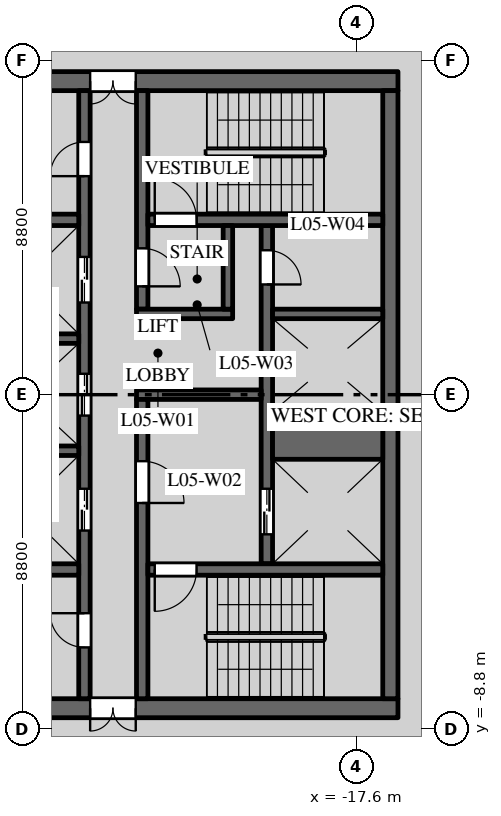
"""IFC4 building model, lengths in metres.
Left out: names, types, materials, properties, quantities, classifications, styles, units other than length and angle.
Written with IfcOpenShell. Run it as: python <this file> out.ifc"""

import sys

from ifc_helpers import new_model, si_unit, direction, frame, frame_2d, origin, place, context, subcontext, project, spatial, rectangle, extrude, element, fill, save


model = new_model("IFC4")
c1 = context("Model", 3, precision=1e-05, world=origin(), true_north=direction((0.0, 1.0)))
c2 = subcontext(c1, "Body", "Model", "MODEL_VIEW")
j1 = project(units=[si_unit("LENGTHUNIT", "METRE"), si_unit("PLANEANGLEUNIT", "RADIAN")], contexts=[c1])
p1 = place(None, origin())
s1 = spatial("IfcSite", under=j1, at=p1, CompositionType="ELEMENT")
p2 = place(p1, origin())
s2 = spatial("IfcBuilding", under=s1, at=p2, CompositionType="ELEMENT")
p3 = place(p2, frame((0.0, 0.0, 30.5)))
s3 = spatial("IfcBuildingStorey", under=s2, at=p3, CompositionType="ELEMENT", Elevation=30.5)
p4 = place(p3, frame((-16.5, 8.25, 0.0), z_axis=(0.0, 0.0, 1.0), x_axis=(-1.0, 0.0, 0.0)))
e1 = element("IfcWall", 1, at=p4, inside=s3, PredefinedType="SHEAR", context=c2, shape_type="SweptSolid", body=[
    extrude(rectangle(XDim=15.0, YDim=0.5, at=frame_2d((7.5, 0.0))), origin(), (0.0, 0.0, 1.0), 3.7),
])
p5 = place(p4, frame((6.9, 0.0, 0.0)))
e2 = element("IfcOpeningElement", 2, at=p5, cuts=e1, PredefinedType="OPENING", context=c2, shape_type="SweptSolid", body=[
    extrude(rectangle(XDim=1.2, YDim=2.1, at=frame_2d((0.6, 1.05))), frame((0.0, 0.26, 0.0), z_axis=(0.0, -1.0, 0.0), x_axis=(1.0, 0.0, 0.0)), (0.0, 0.0, 1.0), 0.52),
])
p6 = place(p4, frame((12.95, 0.0, 0.0)))
e3 = element("IfcOpeningElement", 3, at=p6, cuts=e1, PredefinedType="OPENING", context=c2, shape_type="SweptSolid", body=[
    extrude(rectangle(XDim=0.9, YDim=2.1, at=frame_2d((0.45, 1.05))), frame((0.0, 0.26, 0.0), z_axis=(0.0, -1.0, 0.0), x_axis=(1.0, 0.0, 0.0)), (0.0, 0.0, 1.0), 0.52),
])
p7 = place(p3, frame((-16.5, -8.25, 0.0), z_axis=(0.0, 0.0, 1.0), x_axis=(-1.0, 0.0, 0.0)))
e4 = element("IfcWall", 4, at=p7, inside=s3, PredefinedType="SHEAR", context=c2, shape_type="SweptSolid", body=[
    extrude(rectangle(XDim=15.0, YDim=0.5, at=frame_2d((7.5, 0.0))), origin(), (0.0, 0.0, 1.0), 3.7),
])
p8 = place(p7, frame((6.9, 0.0, 0.0)))
e5 = element("IfcOpeningElement", 5, at=p8, cuts=e4, PredefinedType="OPENING", context=c2, shape_type="SweptSolid", body=[
    extrude(rectangle(XDim=1.2, YDim=2.1, at=frame_2d((0.6, 1.05))), frame((0.0, 0.26, 0.0), z_axis=(0.0, -1.0, 0.0), x_axis=(1.0, 0.0, 0.0)), (0.0, 0.0, 1.0), 0.52),
])
p9 = place(p7, frame((12.95, 0.0, 0.0)))
e6 = element("IfcOpeningElement", 6, at=p9, cuts=e4, PredefinedType="OPENING", context=c2, shape_type="SweptSolid", body=[
    extrude(rectangle(XDim=0.9, YDim=2.1, at=frame_2d((0.45, 1.05))), frame((0.0, 0.26, 0.0), z_axis=(0.0, -1.0, 0.0), x_axis=(1.0, 0.0, 0.0)), (0.0, 0.0, 1.0), 0.52),
])
p10 = place(p3, frame((-19.95, -4.45, 0.0), z_axis=(0.0, 0.0, 1.0), x_axis=(0.0, 1.0, 0.0)))
e7 = element("IfcWall", 7, at=p10, inside=s3, PredefinedType="SHEAR", context=c2, shape_type="SweptSolid", body=[
    extrude(rectangle(XDim=8.9, YDim=0.3, at=frame_2d((4.45, 0.0))), origin(), (0.0, 0.0, 1.0), 3.7),
])
p11 = place(p10, frame((0.775, 0.0, 0.0)))
e8 = element("IfcOpeningElement", 8, at=p11, cuts=e7, PredefinedType="OPENING", context=c2, shape_type="SweptSolid", body=[
    extrude(rectangle(XDim=1.2, YDim=2.1, at=frame_2d((0.6, 1.05))), frame((0.0, 0.16, 0.0), z_axis=(0.0, -1.0, 0.0), x_axis=(1.0, 0.0, 0.0)), (0.0, 0.0, 1.0), 0.32),
])
p12 = place(p10, frame((7.35, 0.0, 0.0)))
e9 = element("IfcOpeningElement", 9, at=p12, cuts=e7, PredefinedType="OPENING", context=c2, shape_type="SweptSolid", body=[
    extrude(rectangle(XDim=0.9, YDim=2.1, at=frame_2d((0.45, 1.05))), frame((0.0, 0.16, 0.0), z_axis=(0.0, -1.0, 0.0), x_axis=(1.0, 0.0, 0.0)), (0.0, 0.0, 1.0), 0.32),
])
p13 = place(p3, frame((-24.75, -8.0, 0.0), z_axis=(0.0, 0.0, 1.0), x_axis=(0.0, 1.0, 0.0)))
e10 = element("IfcWall", 10, at=p13, inside=s3, PredefinedType="SHEAR", context=c2, shape_type="SweptSolid", body=[
    extrude(rectangle(XDim=16.0, YDim=0.3, at=frame_2d((8.0, 0.0))), origin(), (0.0, 0.0, 1.0), 3.7),
])
p14 = place(p13, frame((4.425, 0.0, 0.0)))
e11 = element("IfcOpeningElement", 11, at=p14, cuts=e10, PredefinedType="OPENING", context=c2, shape_type="SweptSolid", body=[
    extrude(rectangle(XDim=1.1, YDim=2.1, at=frame_2d((0.55, 1.05))), frame((0.0, 0.16, 0.0), z_axis=(0.0, -1.0, 0.0), x_axis=(1.0, 0.0, 0.0)), (0.0, 0.0, 1.0), 0.32),
])
p15 = place(p13, frame((7.45, 0.0, 0.0)))
e12 = element("IfcOpeningElement", 12, at=p15, cuts=e10, PredefinedType="OPENING", context=c2, shape_type="SweptSolid", body=[
    extrude(rectangle(XDim=1.1, YDim=2.1, at=frame_2d((0.55, 1.05))), frame((0.0, 0.16, 0.0), z_axis=(0.0, -1.0, 0.0), x_axis=(1.0, 0.0, 0.0)), (0.0, 0.0, 1.0), 0.32),
])
p16 = place(p13, frame((10.425, 0.0, 0.0)))
e13 = element("IfcOpeningElement", 13, at=p16, cuts=e10, PredefinedType="OPENING", context=c2, shape_type="SweptSolid", body=[
    extrude(rectangle(XDim=1.2, YDim=2.1, at=frame_2d((0.6, 1.05))), frame((0.0, 0.16, 0.0), z_axis=(0.0, -1.0, 0.0), x_axis=(1.0, 0.0, 0.0)), (0.0, 0.0, 1.0), 0.32),
])
p17 = place(p13, frame((13.75, 0.0, 0.0)))
e14 = element("IfcOpeningElement", 14, at=p17, cuts=e10, PredefinedType="OPENING", context=c2, shape_type="SweptSolid", body=[
    extrude(rectangle(XDim=0.9, YDim=2.1, at=frame_2d((0.45, 1.05))), frame((0.0, 0.16, 0.0), z_axis=(0.0, -1.0, 0.0), x_axis=(1.0, 0.0, 0.0)), (0.0, 0.0, 1.0), 0.32),
])
p18 = place(p13, frame((1.35, 0.0, 0.0)))
e15 = element("IfcOpeningElement", 15, at=p18, cuts=e10, PredefinedType="OPENING", context=c2, shape_type="SweptSolid", body=[
    extrude(rectangle(XDim=0.9, YDim=2.1, at=frame_2d((0.45, 1.05))), frame((0.0, 0.16, 0.0), z_axis=(0.0, -1.0, 0.0), x_axis=(1.0, 0.0, 0.0)), (0.0, 0.0, 1.0), 0.32),
])
p19 = place(p3, frame((-20.1, 0.0, 0.0), z_axis=(0.0, 0.0, 1.0), x_axis=(-1.0, 0.0, 0.0)))
e16 = element("IfcWall", 16, at=p19, inside=s3, PredefinedType="SHEAR", context=c2, shape_type="SweptSolid", body=[
    extrude(rectangle(XDim=3.28, YDim=0.25, at=frame_2d((1.64, 0.0))), origin(), (0.0, 0.0, 1.0), 3.7),
])
p20 = place(p3, frame((-16.7, -8.0, 0.0), z_axis=(0.0, 0.0, 1.0), x_axis=(0.0, 1.0, 0.0)))
e17 = element("IfcWall", 17, at=p20, inside=s3, PredefinedType="SHEAR", context=c2, shape_type="SweptSolid", body=[
    extrude(rectangle(XDim=16.0, YDim=0.4, at=frame_2d((8.0, 0.0))), origin(), (0.0, 0.0, 1.0), 3.7),
])
p21 = place(p3, frame((-24.9, 4.6, 0.0), z_axis=(0.0, 0.0, 1.0), x_axis=(-1.0, 0.0, 0.0)))
e18 = element("IfcWall", 18, at=p21, inside=s3, PredefinedType="SHEAR", context=c2, shape_type="SweptSolid", body=[
    extrude(rectangle(XDim=6.1, YDim=0.3, at=frame_2d((3.05, 0.0))), origin(), (0.0, 0.0, 1.0), 3.7),
])
p22 = place(p21, frame((4.2, 0.0, 0.0)))
e19 = element("IfcOpeningElement", 19, at=p22, cuts=e18, PredefinedType="OPENING", context=c2, shape_type="SweptSolid", body=[
    extrude(rectangle(XDim=0.9, YDim=2.1, at=frame_2d((0.45, 1.05))), frame((0.0, 0.16, 0.0), z_axis=(0.0, -1.0, 0.0), x_axis=(1.0, 0.0, 0.0)), (0.0, 0.0, 1.0), 0.32),
])
p23 = place(p3, frame((-24.9, -4.6, 0.0), z_axis=(0.0, 0.0, 1.0), x_axis=(-1.0, 0.0, 0.0)))
e20 = element("IfcWall", 20, at=p23, inside=s3, PredefinedType="SHEAR", context=c2, shape_type="SweptSolid", body=[
    extrude(rectangle(XDim=6.1, YDim=0.3, at=frame_2d((3.05, 0.0))), origin(), (0.0, 0.0, 1.0), 3.7),
])
p24 = place(p3, frame((-16.9, -1.075, 0.0), z_axis=(0.0, 0.0, 1.0), x_axis=(-1.0, 0.0, 0.0)))
e21 = element("IfcWall", 21, at=p24, inside=s3, PredefinedType="SHEAR", context=c2, shape_type="SweptSolid", body=[
    extrude(rectangle(XDim=2.9, YDim=1.25, at=frame_2d((1.45, 0.0))), origin(), (0.0, 0.0, 1.0), 3.7),
])
for number, where, z_axis, x_axis in (
    (22, (-16.9, 2.125, 0.0), (0.0, 0.0, 1.0), (-1.0, 0.0, 0.0)),
    (23, (-24.9, -1.475, 0.0), (0.0, 0.0, 1.0), (-1.0, 0.0, 0.0)),
    (24, (-24.9, 1.475, 0.0), (0.0, 0.0, 1.0), (-1.0, 0.0, 0.0)),
):
    element("IfcWall", number, at=place(p3, frame(where, z_axis=z_axis, x_axis=x_axis)), inside=s3, PredefinedType="SHEAR", context=c2, shape_type="SweptSolid", body=[
        extrude(rectangle(XDim=2.9, YDim=0.25, at=frame_2d((1.45, 0.0))), origin(), (0.0, 0.0, 1.0), 3.7),
    ])
p25 = place(p3, frame((-23.23, 2.25, 0.0), z_axis=(0.0, 0.0, 1.0), x_axis=(0.0, 1.0, 0.0)))
e25 = element("IfcWall", 25, at=p25, inside=s3, PredefinedType="SHEAR", context=c2, shape_type="SweptSolid", body=[
    extrude(rectangle(XDim=5.75, YDim=0.3, at=frame_2d((2.875, 0.0))), origin(), (0.0, 0.0, 1.0), 3.7),
])
p26 = place(p25, frame((0.6, 0.0, 0.0)))
e26 = element("IfcOpeningElement", 26, at=p26, cuts=e25, PredefinedType="OPENING", context=c2, shape_type="SweptSolid", body=[
    extrude(rectangle(XDim=1.0, YDim=2.1, at=frame_2d((0.5, 1.05))), frame((0.0, 0.16, 0.0), z_axis=(0.0, -1.0, 0.0), x_axis=(1.0, 0.0, 0.0)), (0.0, 0.0, 1.0), 0.32),
])
p27 = place(p3, frame((-23.23, -8.0, 0.0), z_axis=(0.0, 0.0, 1.0), x_axis=(0.0, 1.0, 0.0)))
e27 = element("IfcWall", 27, at=p27, inside=s3, PredefinedType="SHEAR", context=c2, shape_type="SweptSolid", body=[
    extrude(rectangle(XDim=7.875, YDim=0.3, at=frame_2d((3.938, 0.0))), origin(), (0.0, 0.0, 1.0), 3.7),
])
p28 = place(p27, frame((5.15, 0.0, 0.0)))
e28 = element("IfcOpeningElement", 28, at=p28, cuts=e27, PredefinedType="OPENING", context=c2, shape_type="SweptSolid", body=[
    extrude(rectangle(XDim=1.1, YDim=2.1, at=frame_2d((0.55, 1.05))), frame((0.0, 0.16, 0.0), z_axis=(0.0, -1.0, 0.0), x_axis=(1.0, 0.0, 0.0)), (0.0, 0.0, 1.0), 0.32),
])
p29 = place(p3, frame((-16.9, 4.6, 0.0), z_axis=(0.0, 0.0, 1.0), x_axis=(-1.0, 0.0, 0.0)))
e29 = element("IfcWall", 29, at=p29, inside=s3, PredefinedType="SHEAR", context=c2, shape_type="SweptSolid", body=[
    extrude(rectangle(XDim=6.18, YDim=0.3, at=frame_2d((3.09, 0.0))), origin(), (0.0, 0.0, 1.0), 3.7),
])
p30 = place(p29, frame((4.9, 0.0, 0.0)))
e30 = element("IfcOpeningElement", 30, at=p30, cuts=e29, PredefinedType="OPENING", context=c2, shape_type="SweptSolid", body=[
    extrude(rectangle(XDim=1.1, YDim=2.1, at=frame_2d((0.55, 1.05))), frame((0.0, 0.16, 0.0), z_axis=(0.0, -1.0, 0.0), x_axis=(1.0, 0.0, 0.0)), (0.0, 0.0, 1.0), 0.32),
])
p31 = place(p3, frame((-16.9, -4.6, 0.0), z_axis=(0.0, 0.0, 1.0), x_axis=(-1.0, 0.0, 0.0)))
e31 = element("IfcWall", 31, at=p31, inside=s3, PredefinedType="SHEAR", context=c2, shape_type="SweptSolid", body=[
    extrude(rectangle(XDim=6.18, YDim=0.3, at=frame_2d((3.09, 0.0))), origin(), (0.0, 0.0, 1.0), 3.7),
])
p32 = place(p31, frame((4.9, 0.0, 0.0)))
e32 = element("IfcOpeningElement", 32, at=p32, cuts=e31, PredefinedType="OPENING", context=c2, shape_type="SweptSolid", body=[
    extrude(rectangle(XDim=1.1, YDim=2.1, at=frame_2d((0.55, 1.05))), frame((0.0, 0.16, 0.0), z_axis=(0.0, -1.0, 0.0), x_axis=(1.0, 0.0, 0.0)), (0.0, 0.0, 1.0), 0.32),
])
p33 = place(p3, frame((-20.85, 2.125, 0.0), z_axis=(0.0, 0.0, 1.0), x_axis=(-1.0, 0.0, 0.0)))
e33 = element("IfcWall", 33, at=p33, inside=s3, PredefinedType="SHEAR", context=c2, shape_type="SweptSolid", body=[
    extrude(rectangle(XDim=2.53, YDim=0.25, at=frame_2d((1.265, 0.0))), origin(), (0.0, 0.0, 1.0), 3.7),
])
p34 = place(p3, frame((-20.975, 2.25, 0.0), z_axis=(0.0, 0.0, 1.0), x_axis=(0.0, 1.0, 0.0)))
e34 = element("IfcWall", 34, at=p34, inside=s3, PredefinedType="SHEAR", context=c2, shape_type="SweptSolid", body=[
    extrude(rectangle(XDim=2.2, YDim=0.25, at=frame_2d((1.1, 0.0))), origin(), (0.0, 0.0, 1.0), 3.7),
])
p35 = place(p11, origin())
e35 = element("IfcDoor", 35, at=p35, inside=s3, OperationType="DOUBLE_DOOR_SLIDING", PredefinedType="DOOR", context=c2, shape_type="SweptSolid", body=[
    extrude(rectangle(XDim=1.2, YDim=2.1, at=frame_2d((0.6, 1.05))), frame((0.0, 0.025, 0.0), z_axis=(0.0, -1.0, 0.0), x_axis=(1.0, 0.0, 0.0)), (0.0, 0.0, 1.0), 0.05),
])
fill(e8, e35)
p36 = place(p14, origin())
e36 = element("IfcDoor", 36, at=p36, inside=s3, OperationType="DOUBLE_DOOR_SLIDING", PredefinedType="DOOR", context=c2, shape_type="SweptSolid", body=[
    extrude(rectangle(XDim=1.1, YDim=2.1, at=frame_2d((0.55, 1.05))), frame((0.0, 0.025, 0.0), z_axis=(0.0, -1.0, 0.0), x_axis=(1.0, 0.0, 0.0)), (0.0, 0.0, 1.0), 0.05),
])
fill(e11, e36)
p37 = place(p15, origin())
e37 = element("IfcDoor", 37, at=p37, inside=s3, OperationType="DOUBLE_DOOR_SLIDING", PredefinedType="DOOR", context=c2, shape_type="SweptSolid", body=[
    extrude(rectangle(XDim=1.1, YDim=2.1, at=frame_2d((0.55, 1.05))), frame((0.0, 0.025, 0.0), z_axis=(0.0, -1.0, 0.0), x_axis=(1.0, 0.0, 0.0)), (0.0, 0.0, 1.0), 0.05),
])
fill(e12, e37)
p38 = place(p16, origin())
e38 = element("IfcDoor", 38, at=p38, inside=s3, OperationType="DOUBLE_DOOR_SLIDING", PredefinedType="DOOR", context=c2, shape_type="SweptSolid", body=[
    extrude(rectangle(XDim=1.2, YDim=2.1, at=frame_2d((0.6, 1.05))), frame((0.0, 0.025, 0.0), z_axis=(0.0, -1.0, 0.0), x_axis=(1.0, 0.0, 0.0)), (0.0, 0.0, 1.0), 0.05),
])
fill(e13, e38)
p39 = place(p30, origin())
e39 = element("IfcDoor", 39, at=p39, inside=s3, OperationType="SINGLE_SWING_RIGHT", PredefinedType="DOOR", context=c2, shape_type="SweptSolid", body=[
    extrude(rectangle(XDim=1.1, YDim=2.1, at=frame_2d((0.55, 1.05))), frame((0.0, 0.025, 0.0), z_axis=(0.0, -1.0, 0.0), x_axis=(1.0, 0.0, 0.0)), (0.0, 0.0, 1.0), 0.05),
])
fill(e30, e39)
p40 = place(p32, origin())
e40 = element("IfcDoor", 40, at=p40, inside=s3, OperationType="SINGLE_SWING_LEFT", PredefinedType="DOOR", context=c2, shape_type="SweptSolid", body=[
    extrude(rectangle(XDim=1.1, YDim=2.1, at=frame_2d((0.55, 1.05))), frame((0.0, 0.025, 0.0), z_axis=(0.0, -1.0, 0.0), x_axis=(1.0, 0.0, 0.0)), (0.0, 0.0, 1.0), 0.05),
])
fill(e32, e40)
p41 = place(p28, origin())
e41 = element("IfcDoor", 41, at=p41, inside=s3, OperationType="SINGLE_SWING_LEFT", PredefinedType="DOOR", context=c2, shape_type="SweptSolid", body=[
    extrude(rectangle(XDim=1.1, YDim=2.1, at=frame_2d((0.55, 1.05))), frame((0.0, 0.025, 0.0), z_axis=(0.0, -1.0, 0.0), x_axis=(1.0, 0.0, 0.0)), (0.0, 0.0, 1.0), 0.05),
])
fill(e28, e41)
p42 = place(p26, origin())
e42 = element("IfcDoor", 42, at=p42, inside=s3, OperationType="SINGLE_SWING_LEFT", PredefinedType="DOOR", context=c2, shape_type="SweptSolid", body=[
    extrude(rectangle(XDim=1.0, YDim=2.1, at=frame_2d((0.5, 1.05))), frame((0.0, 0.025, 0.0), z_axis=(0.0, -1.0, 0.0), x_axis=(1.0, 0.0, 0.0)), (0.0, 0.0, 1.0), 0.05),
])
fill(e26, e42)
p43 = place(p5, origin())
e43 = element("IfcDoor", 43, at=p43, inside=s3, OperationType="DOUBLE_DOOR_DOUBLE_SWING", PredefinedType="DOOR", context=c2, shape_type="SweptSolid", body=[
    extrude(rectangle(XDim=1.2, YDim=2.1, at=frame_2d((0.6, 1.05))), frame((0.0, 0.025, 0.0), z_axis=(0.0, -1.0, 0.0), x_axis=(1.0, 0.0, 0.0)), (0.0, 0.0, 1.0), 0.05),
])
fill(e2, e43)
p44 = place(p8, origin())
e44 = element("IfcDoor", 44, at=p44, inside=s3, OperationType="DOUBLE_DOOR_DOUBLE_SWING", PredefinedType="DOOR", context=c2, shape_type="SweptSolid", body=[
    extrude(rectangle(XDim=1.2, YDim=2.1, at=frame_2d((0.6, 1.05))), frame((0.0, 0.025, 0.0), z_axis=(0.0, -1.0, 0.0), x_axis=(1.0, 0.0, 0.0)), (0.0, 0.0, 1.0), 0.05),
])
fill(e5, e44)
p45 = place(p12, origin())
e45 = element("IfcDoor", 45, at=p45, inside=s3, OperationType="SINGLE_SWING_LEFT", PredefinedType="DOOR", context=c2, shape_type="SweptSolid", body=[
    extrude(rectangle(XDim=0.9, YDim=2.1, at=frame_2d((0.45, 1.05))), frame((0.0, 0.025, 0.0), z_axis=(0.0, -1.0, 0.0), x_axis=(1.0, 0.0, 0.0)), (0.0, 0.0, 1.0), 0.05),
])
fill(e9, e45)
p46 = place(p17, origin())
e46 = element("IfcDoor", 46, at=p46, inside=s3, OperationType="SINGLE_SWING_RIGHT", PredefinedType="DOOR", context=c2, shape_type="SweptSolid", body=[
    extrude(rectangle(XDim=0.9, YDim=2.1, at=frame_2d((0.45, 1.05))), frame((0.0, 0.025, 0.0), z_axis=(0.0, -1.0, 0.0), x_axis=(1.0, 0.0, 0.0)), (0.0, 0.0, 1.0), 0.05),
])
fill(e14, e46)
p47 = place(p18, origin())
e47 = element("IfcDoor", 47, at=p47, inside=s3, OperationType="SINGLE_SWING_LEFT", PredefinedType="DOOR", context=c2, shape_type="SweptSolid", body=[
    extrude(rectangle(XDim=0.9, YDim=2.1, at=frame_2d((0.45, 1.05))), frame((0.0, 0.025, 0.0), z_axis=(0.0, -1.0, 0.0), x_axis=(1.0, 0.0, 0.0)), (0.0, 0.0, 1.0), 0.05),
])
fill(e15, e47)
save(model, sys.argv[1])
